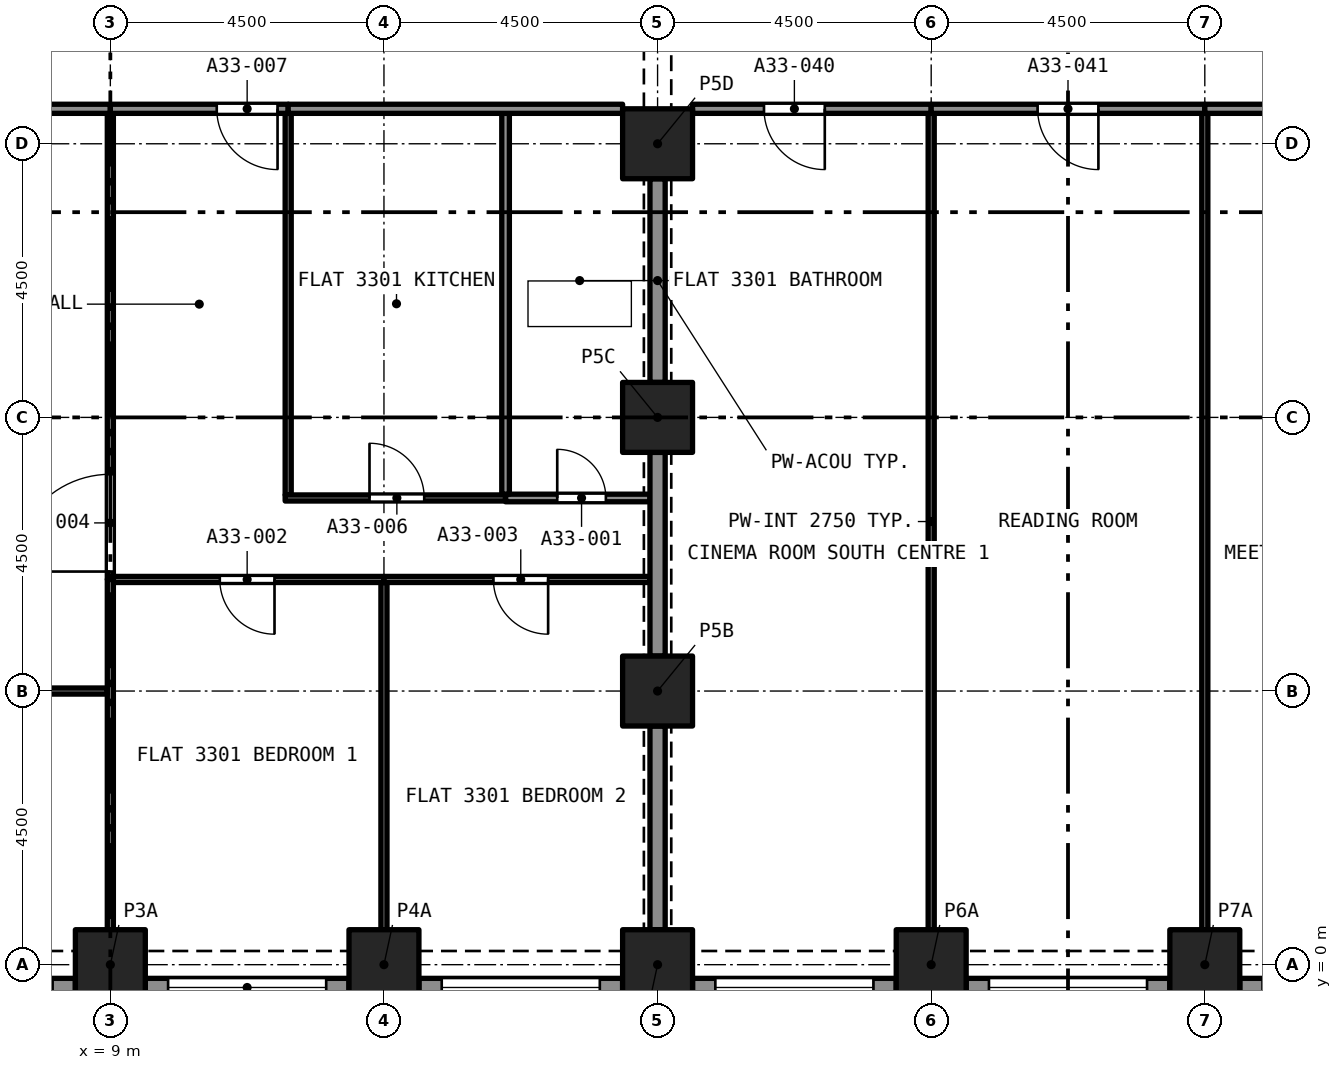
"""IFC4 building model, lengths in metres.
Left out: names, types, materials, properties, quantities, classifications, styles, units other than length and angle.
Written with IfcOpenShell. Run it as: python <this file> out.ifc"""

import sys

from ifc_helpers import new_model, si_unit, direction, frame, frame_2d, origin, origin_2d, place, context, subcontext, project, spatial, rectangle, extrude, element, fill, save


model = new_model("IFC4")
c1 = context("Model", 3, precision=1e-05, world=origin(), true_north=direction((0.0, 1.0)))
c2 = subcontext(c1, "Body", "Model", "MODEL_VIEW")
j1 = project(units=[si_unit("LENGTHUNIT", "METRE"), si_unit("PLANEANGLEUNIT", "RADIAN")], contexts=[c1])
p1 = place(None, origin())
s1 = spatial("IfcSite", under=j1, at=p1, CompositionType="ELEMENT")
p2 = place(p1, origin())
s2 = spatial("IfcBuilding", under=s1, at=p2, CompositionType="ELEMENT")
p3 = place(p2, frame((0.0, 0.0, 118.4)))
s3 = spatial("IfcBuildingStorey", under=s2, at=p3, CompositionType="ELEMENT", Elevation=118.4)
for number, where, z_axis, x_axis in (
    (1, (9.0, 0.0, 0.0), (0.0, 0.0, 1.0), (1.0, 0.0, 0.0)),
    (2, (13.5, 0.0, 0.0), (0.0, 0.0, 1.0), (1.0, 0.0, 0.0)),
    (3, (18.0, 0.0, 0.0), (0.0, 0.0, 1.0), (1.0, 0.0, 0.0)),
    (4, (22.5, 0.0, 0.0), (0.0, 0.0, 1.0), (1.0, 0.0, 0.0)),
    (5, (27.0, 0.0, 0.0), (0.0, 0.0, 1.0), (1.0, 0.0, 0.0)),
    (6, (18.0, 4.5, 0.0), (0.0, 0.0, 1.0), (1.0, 0.0, 0.0)),
    (7, (18.0, 9.0, 0.0), (0.0, 0.0, 1.0), (1.0, 0.0, 0.0)),
    (8, (18.0, 13.5, 0.0), (0.0, 0.0, 1.0), (1.0, 0.0, 0.0)),
):
    element("IfcColumn", number, at=place(p3, frame(where, z_axis=z_axis, x_axis=x_axis)), inside=s3, PredefinedType="COLUMN", context=c2, shape_type="SweptSolid", body=[
        extrude(rectangle(XDim=1.15, YDim=1.15, at=origin_2d()), origin(), (0.0, 0.0, 1.0), 3.2),
    ])
p4 = place(p3, frame((8.425, -0.375, 0.0), z_axis=(0.0, 0.0, 1.0), x_axis=(-1.0, 0.0, 0.0)))
e9 = element("IfcWall", 9, at=p4, inside=s3, PredefinedType="SOLIDWALL", context=c2, shape_type="SweptSolid", body=[
    extrude(rectangle(XDim=3.35, YDim=0.3, at=frame_2d((1.675, 0.0))), origin(), (0.0, 0.0, 1.0), 3.2),
])
p5 = place(p4, frame((0.375, 0.0, 0.45)))
e10 = element("IfcOpeningElement", 10, at=p5, cuts=e9, PredefinedType="OPENING", context=c2, shape_type="SweptSolid", body=[
    extrude(rectangle(XDim=2.6, YDim=1.95, at=frame_2d((1.3, 0.975))), frame((0.0, 0.16, 0.0), z_axis=(0.0, -1.0, 0.0), x_axis=(1.0, 0.0, 0.0)), (0.0, 0.0, 1.0), 0.32),
])
p6 = place(p3, frame((12.925, -0.375, 0.0), z_axis=(0.0, 0.0, 1.0), x_axis=(-1.0, 0.0, 0.0)))
e11 = element("IfcWall", 11, at=p6, inside=s3, PredefinedType="SOLIDWALL", context=c2, shape_type="SweptSolid", body=[
    extrude(rectangle(XDim=3.35, YDim=0.3, at=frame_2d((1.675, 0.0))), origin(), (0.0, 0.0, 1.0), 3.2),
])
p7 = place(p6, frame((0.375, 0.0, 0.45)))
e12 = element("IfcOpeningElement", 12, at=p7, cuts=e11, PredefinedType="OPENING", context=c2, shape_type="SweptSolid", body=[
    extrude(rectangle(XDim=2.6, YDim=1.95, at=frame_2d((1.3, 0.975))), frame((0.0, 0.16, 0.0), z_axis=(0.0, -1.0, 0.0), x_axis=(1.0, 0.0, 0.0)), (0.0, 0.0, 1.0), 0.32),
])
p8 = place(p3, frame((17.425, -0.375, 0.0), z_axis=(0.0, 0.0, 1.0), x_axis=(-1.0, 0.0, 0.0)))
e13 = element("IfcWall", 13, at=p8, inside=s3, PredefinedType="SOLIDWALL", context=c2, shape_type="SweptSolid", body=[
    extrude(rectangle(XDim=3.35, YDim=0.3, at=frame_2d((1.675, 0.0))), origin(), (0.0, 0.0, 1.0), 3.2),
])
p9 = place(p8, frame((0.375, 0.0, 0.45)))
e14 = element("IfcOpeningElement", 14, at=p9, cuts=e13, PredefinedType="OPENING", context=c2, shape_type="SweptSolid", body=[
    extrude(rectangle(XDim=2.6, YDim=1.95, at=frame_2d((1.3, 0.975))), frame((0.0, 0.16, 0.0), z_axis=(0.0, -1.0, 0.0), x_axis=(1.0, 0.0, 0.0)), (0.0, 0.0, 1.0), 0.32),
])
p10 = place(p3, frame((21.925, -0.375, 0.0), z_axis=(0.0, 0.0, 1.0), x_axis=(-1.0, 0.0, 0.0)))
e15 = element("IfcWall", 15, at=p10, inside=s3, PredefinedType="SOLIDWALL", context=c2, shape_type="SweptSolid", body=[
    extrude(rectangle(XDim=3.35, YDim=0.3, at=frame_2d((1.675, 0.0))), origin(), (0.0, 0.0, 1.0), 3.2),
])
p11 = place(p10, frame((0.375, 0.0, 0.45)))
e16 = element("IfcOpeningElement", 16, at=p11, cuts=e15, PredefinedType="OPENING", context=c2, shape_type="SweptSolid", body=[
    extrude(rectangle(XDim=2.6, YDim=1.95, at=frame_2d((1.3, 0.975))), frame((0.0, 0.16, 0.0), z_axis=(0.0, -1.0, 0.0), x_axis=(1.0, 0.0, 0.0)), (0.0, 0.0, 1.0), 0.32),
])
p12 = place(p3, frame((26.425, -0.375, 0.0), z_axis=(0.0, 0.0, 1.0), x_axis=(-1.0, 0.0, 0.0)))
e17 = element("IfcWall", 17, at=p12, inside=s3, PredefinedType="SOLIDWALL", context=c2, shape_type="SweptSolid", body=[
    extrude(rectangle(XDim=3.35, YDim=0.3, at=frame_2d((1.675, 0.0))), origin(), (0.0, 0.0, 1.0), 3.2),
])
p13 = place(p12, frame((0.375, 0.0, 0.45)))
e18 = element("IfcOpeningElement", 18, at=p13, cuts=e17, PredefinedType="OPENING", context=c2, shape_type="SweptSolid", body=[
    extrude(rectangle(XDim=2.6, YDim=1.95, at=frame_2d((1.3, 0.975))), frame((0.0, 0.16, 0.0), z_axis=(0.0, -1.0, 0.0), x_axis=(1.0, 0.0, 0.0)), (0.0, 0.0, 1.0), 0.32),
])
p14 = place(p3, frame((30.925, -0.375, 0.0), z_axis=(0.0, 0.0, 1.0), x_axis=(-1.0, 0.0, 0.0)))
e19 = element("IfcWall", 19, at=p14, inside=s3, PredefinedType="SOLIDWALL", context=c2, shape_type="SweptSolid", body=[
    extrude(rectangle(XDim=3.35, YDim=0.3, at=frame_2d((1.675, 0.0))), origin(), (0.0, 0.0, 1.0), 3.2),
])
p15 = place(p14, frame((0.375, 0.0, 0.45)))
e20 = element("IfcOpeningElement", 20, at=p15, cuts=e19, PredefinedType="OPENING", context=c2, shape_type="SweptSolid", body=[
    extrude(rectangle(XDim=2.6, YDim=1.95, at=frame_2d((1.3, 0.975))), frame((0.0, 0.16, 0.0), z_axis=(0.0, -1.0, 0.0), x_axis=(1.0, 0.0, 0.0)), (0.0, 0.0, 1.0), 0.32),
])
p16 = place(p3, frame((15.5, 7.675, 0.0), z_axis=(0.0, 0.0, 1.0), x_axis=(1.0, 0.0, 0.0)))
e21 = element("IfcWall", 21, at=p16, inside=s3, PredefinedType="PARTITIONING", context=c2, shape_type="SweptSolid", body=[
    extrude(rectangle(XDim=2.375, YDim=0.125, at=frame_2d((1.188, 0.0))), origin(), (0.0, 0.0, 1.0), 2.9),
])
p17 = place(p16, frame((0.85, 0.0, 0.0)))
e22 = element("IfcOpeningElement", 22, at=p17, cuts=e21, PredefinedType="OPENING", context=c2, shape_type="SweptSolid", body=[
    extrude(rectangle(XDim=0.8, YDim=2.1, at=frame_2d((0.4, 1.05))), frame((0.0, 0.073, 0.0), z_axis=(0.0, -1.0, 0.0), x_axis=(1.0, 0.0, 0.0)), (0.0, 0.0, 1.0), 0.145),
])
p18 = place(p3, frame((15.5, 7.738, 0.0), z_axis=(0.0, 0.0, 1.0), x_axis=(0.0, 1.0, 0.0)))
e23 = element("IfcWall", 23, at=p18, inside=s3, PredefinedType="PARTITIONING", context=c2, shape_type="SweptSolid", body=[
    extrude(rectangle(XDim=6.262, YDim=0.125, at=frame_2d((3.131, 0.0))), origin(), (0.0, 0.0, 1.0), 2.9),
])
p19 = place(p3, frame((18.0, 9.575, 0.0), z_axis=(0.0, 0.0, 1.0), x_axis=(0.0, 1.0, 0.0)))
e24 = element("IfcWall", 24, at=p19, inside=s3, PredefinedType="PARTITIONING", context=c2, shape_type="SweptSolid", body=[
    extrude(rectangle(XDim=3.35, YDim=0.25, at=frame_2d((1.675, 0.0))), origin(), (0.0, 0.0, 1.0), 2.38),
])
p20 = place(p3, frame((13.5, 0.575, 0.0), z_axis=(0.0, 0.0, 1.0), x_axis=(0.0, 1.0, 0.0)))
e25 = element("IfcWall", 25, at=p20, inside=s3, PredefinedType="PARTITIONING", context=c2, shape_type="SweptSolid", body=[
    extrude(rectangle(XDim=5.71, YDim=0.1, at=frame_2d((2.855, 0.0))), origin(), (0.0, 0.0, 1.0), 2.9),
])
p21 = place(p3, frame((13.5, 6.335, 0.0), z_axis=(0.0, 0.0, 1.0), x_axis=(-1.0, 0.0, 0.0)))
e26 = element("IfcWall", 26, at=p21, inside=s3, PredefinedType="PARTITIONING", context=c2, shape_type="SweptSolid", body=[
    extrude(rectangle(XDim=4.45, YDim=0.1, at=frame_2d((2.225, 0.0))), origin(), (0.0, 0.0, 1.0), 2.9),
])
p22 = place(p21, frame((1.8, 0.0, 0.0)))
e27 = element("IfcOpeningElement", 27, at=p22, cuts=e26, PredefinedType="OPENING", context=c2, shape_type="SweptSolid", body=[
    extrude(rectangle(XDim=0.9, YDim=2.1, at=frame_2d((0.45, 1.05))), frame((0.0, 0.06, 0.0), z_axis=(0.0, -1.0, 0.0), x_axis=(1.0, 0.0, 0.0)), (0.0, 0.0, 1.0), 0.12),
])
p23 = place(p3, frame((9.0, 0.575, 0.0), z_axis=(0.0, 0.0, 1.0), x_axis=(0.0, 1.0, 0.0)))
e28 = element("IfcWall", 28, at=p23, inside=s3, PredefinedType="PARTITIONING", context=c2, shape_type="SweptSolid", body=[
    extrude(rectangle(XDim=5.76, YDim=0.1, at=frame_2d((2.88, 0.0))), origin(), (0.0, 0.0, 1.0), 2.9),
])
p24 = place(p3, frame((17.875, 6.335, 0.0), z_axis=(0.0, 0.0, 1.0), x_axis=(-1.0, 0.0, 0.0)))
e29 = element("IfcWall", 29, at=p24, inside=s3, PredefinedType="PARTITIONING", context=c2, shape_type="SweptSolid", body=[
    extrude(rectangle(XDim=4.375, YDim=0.1, at=frame_2d((2.188, 0.0))), origin(), (0.0, 0.0, 1.0), 2.9),
])
p25 = place(p24, frame((1.675, 0.0, 0.0)))
e30 = element("IfcOpeningElement", 30, at=p25, cuts=e29, PredefinedType="OPENING", context=c2, shape_type="SweptSolid", body=[
    extrude(rectangle(XDim=0.9, YDim=2.1, at=frame_2d((0.45, 1.05))), frame((0.0, 0.06, 0.0), z_axis=(0.0, -1.0, 0.0), x_axis=(1.0, 0.0, 0.0)), (0.0, 0.0, 1.0), 0.12),
])
for number, where, z_axis, x_axis in (
    (31, (18.0, 5.075, 0.0), (0.0, 0.0, 1.0), (0.0, 1.0, 0.0)),
    (32, (18.0, 0.575, 0.0), (0.0, 0.0, 1.0), (0.0, 1.0, 0.0)),
):
    element("IfcWall", number, at=place(p3, frame(where, z_axis=z_axis, x_axis=x_axis)), inside=s3, PredefinedType="PARTITIONING", context=c2, shape_type="SweptSolid", body=[
        extrude(rectangle(XDim=3.35, YDim=0.25, at=frame_2d((1.675, 0.0))), origin(), (0.0, 0.0, 1.0), 2.38),
    ])
p26 = place(p3, frame((9.0, 6.335, 0.0), z_axis=(0.0, 0.0, 1.0), x_axis=(0.0, 1.0, 0.0)))
e33 = element("IfcWall", 33, at=p26, inside=s3, PredefinedType="PARTITIONING", context=c2, shape_type="SweptSolid", body=[
    extrude(rectangle(XDim=7.665, YDim=0.1, at=frame_2d((3.833, 0.0))), origin(), (0.0, 0.0, 1.0), 2.9),
])
p27 = place(p26, frame((0.13, 0.0, 0.0)))
e34 = element("IfcOpeningElement", 34, at=p27, cuts=e33, PredefinedType="OPENING", context=c2, shape_type="SweptSolid", body=[
    extrude(rectangle(XDim=1.6, YDim=2.1, at=frame_2d((0.8, 1.05))), frame((0.0, 0.06, 0.0), z_axis=(0.0, -1.0, 0.0), x_axis=(1.0, 0.0, 0.0)), (0.0, 0.0, 1.0), 0.12),
])
p28 = place(p3, frame((0.622, 4.5, 0.0), z_axis=(0.0, 0.0, 1.0), x_axis=(1.0, 0.0, 0.0)))
e35 = element("IfcWall", 35, at=p28, inside=s3, PredefinedType="PARTITIONING", context=c2, shape_type="SweptSolid", body=[
    extrude(rectangle(XDim=8.328, YDim=0.1, at=frame_2d((4.164, 0.0))), origin(), (0.0, 0.0, 1.0), 2.9),
])
p29 = place(p28, frame((3.365, 0.0, 0.0)))
e36 = element("IfcOpeningElement", 36, at=p29, cuts=e35, PredefinedType="OPENING", context=c2, shape_type="SweptSolid", body=[
    extrude(rectangle(XDim=1.6, YDim=2.1, at=frame_2d((0.8, 1.05))), frame((0.0, 0.06, 0.0), z_axis=(0.0, -1.0, 0.0), x_axis=(1.0, 0.0, 0.0)), (0.0, 0.0, 1.0), 0.12),
])
p30 = place(p3, frame((0.575, 14.075, 0.0), z_axis=(0.0, 0.0, 1.0), x_axis=(1.0, 0.0, 0.0)))
e37 = element("IfcWall", 37, at=p30, inside=s3, PredefinedType="PARTITIONING", context=c2, shape_type="SweptSolid", body=[
    extrude(rectangle(XDim=8.425, YDim=0.15, at=frame_2d((4.212, 0.0))), origin(), (0.0, 0.0, 1.0), 2.9),
])
p31 = place(p3, frame((11.925, 7.725, 0.0), z_axis=(0.0, 0.0, 1.0), x_axis=(0.0, 1.0, 0.0)))
e38 = element("IfcWall", 38, at=p31, inside=s3, PredefinedType="PARTITIONING", context=c2, shape_type="SweptSolid", body=[
    extrude(rectangle(XDim=6.275, YDim=0.1, at=frame_2d((3.137, 0.0))), origin(), (0.0, 0.0, 1.0), 2.9),
])
p32 = place(p3, frame((11.875, 7.675, 0.0), z_axis=(0.0, 0.0, 1.0), x_axis=(1.0, 0.0, 0.0)))
e39 = element("IfcWall", 39, at=p32, inside=s3, PredefinedType="PARTITIONING", context=c2, shape_type="SweptSolid", body=[
    extrude(rectangle(XDim=3.625, YDim=0.1, at=frame_2d((1.812, 0.0))), origin(), (0.0, 0.0, 1.0), 2.9),
])
p33 = place(p32, frame((1.387, 0.0, 0.0)))
e40 = element("IfcOpeningElement", 40, at=p33, cuts=e39, PredefinedType="OPENING", context=c2, shape_type="SweptSolid", body=[
    extrude(rectangle(XDim=0.9, YDim=2.1, at=frame_2d((0.45, 1.05))), frame((0.0, 0.06, 0.0), z_axis=(0.0, -1.0, 0.0), x_axis=(1.0, 0.0, 0.0)), (0.0, 0.0, 1.0), 0.12),
])
p34 = place(p3, frame((11.925, 14.075, 0.0), z_axis=(0.0, 0.0, 1.0), x_axis=(-1.0, 0.0, 0.0)))
e41 = element("IfcWall", 41, at=p34, inside=s3, PredefinedType="PARTITIONING", context=c2, shape_type="SweptSolid", body=[
    extrude(rectangle(XDim=2.925, YDim=0.15, at=frame_2d((1.462, 0.0))), origin(), (0.0, 0.0, 1.0), 2.9),
])
p35 = place(p34, frame((0.175, 0.0, 0.0)))
e42 = element("IfcOpeningElement", 42, at=p35, cuts=e41, PredefinedType="OPENING", context=c2, shape_type="SweptSolid", body=[
    extrude(rectangle(XDim=1.0, YDim=2.1, at=frame_2d((0.5, 1.05))), frame((0.0, 0.085, 0.0), z_axis=(0.0, -1.0, 0.0), x_axis=(1.0, 0.0, 0.0)), (0.0, 0.0, 1.0), 0.17),
])
p36 = place(p3, frame((11.925, 14.075, 0.0), z_axis=(0.0, 0.0, 1.0), x_axis=(1.0, 0.0, 0.0)))
e43 = element("IfcWall", 43, at=p36, inside=s3, PredefinedType="PARTITIONING", context=c2, shape_type="SweptSolid", body=[
    extrude(rectangle(XDim=5.5, YDim=0.15, at=frame_2d((2.75, 0.0))), origin(), (0.0, 0.0, 1.0), 2.9),
])
p37 = place(p3, frame((22.5, 0.575, 0.0), z_axis=(0.0, 0.0, 1.0), x_axis=(0.0, 1.0, 0.0)))
e44 = element("IfcWall", 44, at=p37, inside=s3, PredefinedType="PARTITIONING", context=c2, shape_type="SweptSolid", body=[
    extrude(rectangle(XDim=13.425, YDim=0.1, at=frame_2d((6.712, 0.0))), origin(), (0.0, 0.0, 1.0), 2.75),
])
p38 = place(p3, frame((22.5, 14.075, 0.0), z_axis=(0.0, 0.0, 1.0), x_axis=(-1.0, 0.0, 0.0)))
e45 = element("IfcWall", 45, at=p38, inside=s3, PredefinedType="PARTITIONING", context=c2, shape_type="SweptSolid", body=[
    extrude(rectangle(XDim=3.925, YDim=0.15, at=frame_2d((1.962, 0.0))), origin(), (0.0, 0.0, 1.0), 2.75),
])
p39 = place(p38, frame((1.75, 0.0, 0.0)))
e46 = element("IfcOpeningElement", 46, at=p39, cuts=e45, PredefinedType="OPENING", context=c2, shape_type="SweptSolid", body=[
    extrude(rectangle(XDim=1.0, YDim=2.1, at=frame_2d((0.5, 1.05))), frame((0.0, 0.085, 0.0), z_axis=(0.0, -1.0, 0.0), x_axis=(1.0, 0.0, 0.0)), (0.0, 0.0, 1.0), 0.17),
])
p40 = place(p3, frame((27.0, 0.575, 0.0), z_axis=(0.0, 0.0, 1.0), x_axis=(0.0, 1.0, 0.0)))
e47 = element("IfcWall", 47, at=p40, inside=s3, PredefinedType="PARTITIONING", context=c2, shape_type="SweptSolid", body=[
    extrude(rectangle(XDim=13.425, YDim=0.1, at=frame_2d((6.712, 0.0))), origin(), (0.0, 0.0, 1.0), 2.75),
])
p41 = place(p3, frame((27.0, 14.075, 0.0), z_axis=(0.0, 0.0, 1.0), x_axis=(-1.0, 0.0, 0.0)))
e48 = element("IfcWall", 48, at=p41, inside=s3, PredefinedType="PARTITIONING", context=c2, shape_type="SweptSolid", body=[
    extrude(rectangle(XDim=4.5, YDim=0.15, at=frame_2d((2.25, 0.0))), origin(), (0.0, 0.0, 1.0), 2.75),
])
p42 = place(p41, frame((1.75, 0.0, 0.0)))
e49 = element("IfcOpeningElement", 49, at=p42, cuts=e48, PredefinedType="OPENING", context=c2, shape_type="SweptSolid", body=[
    extrude(rectangle(XDim=1.0, YDim=2.1, at=frame_2d((0.5, 1.05))), frame((0.0, 0.085, 0.0), z_axis=(0.0, -1.0, 0.0), x_axis=(1.0, 0.0, 0.0)), (0.0, 0.0, 1.0), 0.17),
])
p43 = place(p3, frame((30.925, 14.075, 0.0), z_axis=(0.0, 0.0, 1.0), x_axis=(-1.0, 0.0, 0.0)))
e50 = element("IfcWall", 50, at=p43, inside=s3, PredefinedType="PARTITIONING", context=c2, shape_type="SweptSolid", body=[
    extrude(rectangle(XDim=3.925, YDim=0.15, at=frame_2d((1.962, 0.0))), origin(), (0.0, 0.0, 1.0), 2.75),
])
p44 = place(p43, frame((1.175, 0.0, 0.0)))
e51 = element("IfcOpeningElement", 51, at=p44, cuts=e50, PredefinedType="OPENING", context=c2, shape_type="SweptSolid", body=[
    extrude(rectangle(XDim=1.0, YDim=2.1, at=frame_2d((0.5, 1.05))), frame((0.0, 0.085, 0.0), z_axis=(0.0, -1.0, 0.0), x_axis=(1.0, 0.0, 0.0)), (0.0, 0.0, 1.0), 0.17),
])
p45 = place(p7, origin())
e52 = element("IfcWindow", 52, at=p45, inside=s3, PartitioningType="SINGLE_PANEL", PredefinedType="WINDOW", context=c2, shape_type="SweptSolid", body=[
    extrude(rectangle(XDim=2.6, YDim=1.95, at=frame_2d((1.3, 0.975))), frame((0.0, 0.03, 0.0), z_axis=(0.0, -1.0, 0.0), x_axis=(1.0, 0.0, 0.0)), (0.0, 0.0, 1.0), 0.06),
])
fill(e12, e52)
p46 = place(p9, origin())
e53 = element("IfcWindow", 53, at=p46, inside=s3, PartitioningType="SINGLE_PANEL", PredefinedType="WINDOW", context=c2, shape_type="SweptSolid", body=[
    extrude(rectangle(XDim=2.6, YDim=1.95, at=frame_2d((1.3, 0.975))), frame((0.0, 0.03, 0.0), z_axis=(0.0, -1.0, 0.0), x_axis=(1.0, 0.0, 0.0)), (0.0, 0.0, 1.0), 0.06),
])
fill(e14, e53)
p47 = place(p11, origin())
e54 = element("IfcWindow", 54, at=p47, inside=s3, PartitioningType="SINGLE_PANEL", PredefinedType="WINDOW", context=c2, shape_type="SweptSolid", body=[
    extrude(rectangle(XDim=2.6, YDim=1.95, at=frame_2d((1.3, 0.975))), frame((0.0, 0.03, 0.0), z_axis=(0.0, -1.0, 0.0), x_axis=(1.0, 0.0, 0.0)), (0.0, 0.0, 1.0), 0.06),
])
fill(e16, e54)
p48 = place(p13, origin())
e55 = element("IfcWindow", 55, at=p48, inside=s3, PartitioningType="SINGLE_PANEL", PredefinedType="WINDOW", context=c2, shape_type="SweptSolid", body=[
    extrude(rectangle(XDim=2.6, YDim=1.95, at=frame_2d((1.3, 0.975))), frame((0.0, 0.03, 0.0), z_axis=(0.0, -1.0, 0.0), x_axis=(1.0, 0.0, 0.0)), (0.0, 0.0, 1.0), 0.06),
])
fill(e18, e55)
p49 = place(p17, origin())
e56 = element("IfcDoor", 56, at=p49, inside=s3, OperationType="SINGLE_SWING_RIGHT", PredefinedType="DOOR", context=c2, shape_type="SweptSolid", body=[
    extrude(rectangle(XDim=0.8, YDim=2.1, at=frame_2d((0.4, 1.05))), frame((0.0, 0.025, 0.0), z_axis=(0.0, -1.0, 0.0), x_axis=(1.0, 0.0, 0.0)), (0.0, 0.0, 1.0), 0.05),
])
fill(e22, e56)
p50 = place(p22, origin())
e57 = element("IfcDoor", 57, at=p50, inside=s3, OperationType="SINGLE_SWING_RIGHT", PredefinedType="DOOR", context=c2, shape_type="SweptSolid", body=[
    extrude(rectangle(XDim=0.9, YDim=2.1, at=frame_2d((0.45, 1.05))), frame((0.0, 0.025, 0.0), z_axis=(0.0, -1.0, 0.0), x_axis=(1.0, 0.0, 0.0)), (0.0, 0.0, 1.0), 0.05),
])
fill(e27, e57)
p51 = place(p25, origin())
e58 = element("IfcDoor", 58, at=p51, inside=s3, OperationType="SINGLE_SWING_LEFT", PredefinedType="DOOR", context=c2, shape_type="SweptSolid", body=[
    extrude(rectangle(XDim=0.9, YDim=2.1, at=frame_2d((0.45, 1.05))), frame((0.0, 0.025, 0.0), z_axis=(0.0, -1.0, 0.0), x_axis=(1.0, 0.0, 0.0)), (0.0, 0.0, 1.0), 0.05),
])
fill(e30, e58)
p52 = place(p27, origin())
e59 = element("IfcDoor", 59, at=p52, inside=s3, OperationType="SINGLE_SWING_LEFT", PredefinedType="DOOR", context=c2, shape_type="SweptSolid", body=[
    extrude(rectangle(XDim=1.6, YDim=2.1, at=frame_2d((0.8, 1.05))), frame((0.0, 0.025, 0.0), z_axis=(0.0, -1.0, 0.0), x_axis=(1.0, 0.0, 0.0)), (0.0, 0.0, 1.0), 0.05),
])
fill(e34, e59)
p53 = place(p33, origin())
e60 = element("IfcDoor", 60, at=p53, inside=s3, OperationType="SINGLE_SWING_RIGHT", PredefinedType="DOOR", context=c2, shape_type="SweptSolid", body=[
    extrude(rectangle(XDim=0.9, YDim=2.1, at=frame_2d((0.45, 1.05))), frame((0.0, 0.025, 0.0), z_axis=(0.0, -1.0, 0.0), x_axis=(1.0, 0.0, 0.0)), (0.0, 0.0, 1.0), 0.05),
])
fill(e40, e60)
p54 = place(p35, origin())
e61 = element("IfcDoor", 61, at=p54, inside=s3, OperationType="SINGLE_SWING_LEFT", PredefinedType="DOOR", context=c2, shape_type="SweptSolid", body=[
    extrude(rectangle(XDim=1.0, YDim=2.1, at=frame_2d((0.5, 1.05))), frame((0.0, 0.025, 0.0), z_axis=(0.0, -1.0, 0.0), x_axis=(1.0, 0.0, 0.0)), (0.0, 0.0, 1.0), 0.05),
])
fill(e42, e61)
p55 = place(p39, origin())
e62 = element("IfcDoor", 62, at=p55, inside=s3, OperationType="SINGLE_SWING_RIGHT", PredefinedType="DOOR", context=c2, shape_type="SweptSolid", body=[
    extrude(rectangle(XDim=1.0, YDim=2.1, at=frame_2d((0.5, 1.05))), frame((0.0, 0.025, 0.0), z_axis=(0.0, -1.0, 0.0), x_axis=(1.0, 0.0, 0.0)), (0.0, 0.0, 1.0), 0.05),
])
fill(e46, e62)
p56 = place(p42, origin())
e63 = element("IfcDoor", 63, at=p56, inside=s3, OperationType="SINGLE_SWING_RIGHT", PredefinedType="DOOR", context=c2, shape_type="SweptSolid", body=[
    extrude(rectangle(XDim=1.0, YDim=2.1, at=frame_2d((0.5, 1.05))), frame((0.0, 0.025, 0.0), z_axis=(0.0, -1.0, 0.0), x_axis=(1.0, 0.0, 0.0)), (0.0, 0.0, 1.0), 0.05),
])
fill(e49, e63)
save(model, sys.argv[1])
